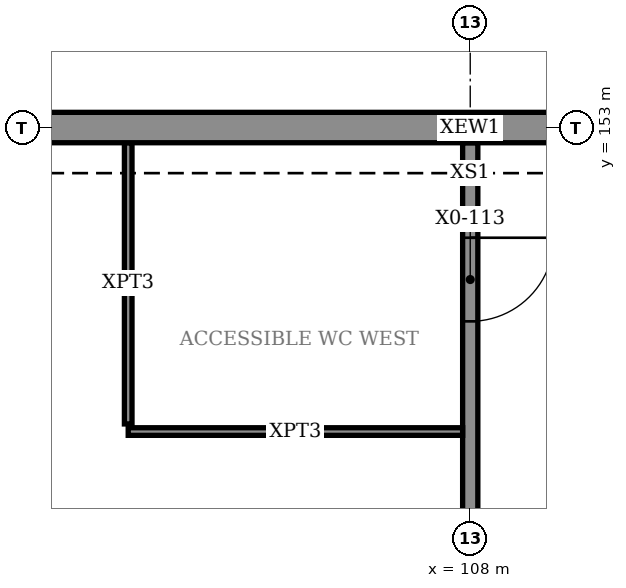
"""IFC4 building model, lengths in metres.
Left out: names, types, materials, properties, quantities, classifications, styles, units other than length and angle.
Written with IfcOpenShell. Run it as: python <this file> out.ifc"""

import sys

from ifc_helpers import new_model, si_unit, direction, frame, frame_2d, origin, place, context, subcontext, project, spatial, rectangle, extrude, element, fill, save


model = new_model("IFC4")
c1 = context("Model", 3, precision=1e-05, world=origin(), true_north=direction((0.0, 1.0)))
c2 = subcontext(c1, "Body", "Model", "MODEL_VIEW")
j1 = project(units=[si_unit("LENGTHUNIT", "METRE"), si_unit("PLANEANGLEUNIT", "RADIAN")], contexts=[c1])
p1 = place(None, origin())
s1 = spatial("IfcSite", under=j1, at=p1, CompositionType="ELEMENT")
p2 = place(p1, origin())
s2 = spatial("IfcBuilding", under=s1, at=p2, CompositionType="ELEMENT")
p3 = place(p2, origin())
s3 = spatial("IfcBuildingStorey", under=s2, at=p3, CompositionType="ELEMENT", Elevation=0.0)
p4 = place(p3, frame((99.5, 153.0, 0.0), z_axis=(0.0, 0.0, 1.0), x_axis=(1.0, 0.0, 0.0)))
e1 = element("IfcWall", 1, at=p4, inside=s3, PredefinedType="SOLIDWALL", context=c2, shape_type="SweptSolid", body=[
    extrude(rectangle(XDim=17.0, YDim=0.4, at=frame_2d((8.5, 0.0))), origin(), (0.0, 0.0, 1.0), 6.0),
])
p5 = place(p4, frame((11.55, 0.0, 0.0)))
e2 = element("IfcOpeningElement", 2, at=p5, cuts=e1, PredefinedType="OPENING", context=c2, shape_type="SweptSolid", body=[
    extrude(rectangle(XDim=2.7, YDim=2.4, at=frame_2d((1.35, 1.2))), frame((0.0, 0.21, 0.0), z_axis=(0.0, -1.0, 0.0), x_axis=(1.0, 0.0, 0.0)), (0.0, 0.0, 1.0), 0.42),
])
p6 = place(p3, frame((108.0, 135.2, 0.0), z_axis=(0.0, 0.0, 1.0), x_axis=(0.0, 1.0, 0.0)))
e3 = element("IfcWall", 3, at=p6, inside=s3, PredefinedType="PARTITIONING", context=c2, shape_type="SweptSolid", body=[
    extrude(rectangle(XDim=17.6, YDim=0.2, at=frame_2d((8.8, 0.0))), origin(), (0.0, 0.0, 1.0), 6.0),
])
p7 = place(p6, frame((3.35, 0.0, 0.015)))
e4 = element("IfcOpeningElement", 4, at=p7, cuts=e3, PredefinedType="OPENING", context=c2, shape_type="SweptSolid", body=[
    extrude(rectangle(XDim=0.9, YDim=2.1, at=frame_2d((0.45, 1.05))), frame((0.0, 0.11, 0.0), z_axis=(0.0, -1.0, 0.0), x_axis=(1.0, 0.0, 0.0)), (0.0, 0.0, 1.0), 0.22),
])
p8 = place(p6, frame((10.35, 0.0, 0.015)))
e5 = element("IfcOpeningElement", 5, at=p8, cuts=e3, PredefinedType="OPENING", context=c2, shape_type="SweptSolid", body=[
    extrude(rectangle(XDim=0.9, YDim=2.1, at=frame_2d((0.45, 1.05))), frame((0.0, 0.11, 0.0), z_axis=(0.0, -1.0, 0.0), x_axis=(1.0, 0.0, 0.0)), (0.0, 0.0, 1.0), 0.22),
])
p9 = place(p6, frame((15.25, 0.0, 0.015)))
e6 = element("IfcOpeningElement", 6, at=p9, cuts=e3, PredefinedType="OPENING", context=c2, shape_type="SweptSolid", body=[
    extrude(rectangle(XDim=1.1, YDim=2.4, at=frame_2d((0.55, 1.2))), frame((0.0, 0.11, 0.0), z_axis=(0.0, -1.0, 0.0), x_axis=(1.0, 0.0, 0.0)), (0.0, 0.0, 1.0), 0.22),
])
p10 = place(p3, frame((103.5, 149.0, 0.0), z_axis=(0.0, 0.0, 1.0), x_axis=(1.0, 0.0, 0.0)))
e7 = element("IfcWall", 7, at=p10, inside=s3, PredefinedType="PARTITIONING", context=c2, shape_type="SweptSolid", body=[
    extrude(rectangle(XDim=4.4, YDim=0.1, at=frame_2d((2.2, 0.0))), origin(), (0.0, 0.0, 1.0), 6.0),
])
p11 = place(p3, frame((103.5, 149.1, 0.0), z_axis=(0.0, 0.0, 1.0), x_axis=(0.0, 1.0, 0.0)))
e8 = element("IfcWall", 8, at=p11, inside=s3, PredefinedType="PARTITIONING", context=c2, shape_type="SweptSolid", body=[
    extrude(rectangle(XDim=3.7, YDim=0.1, at=frame_2d((1.85, 0.0))), origin(), (0.0, 0.0, 1.0), 6.0),
])
p12 = place(p9, frame((1.1, 0.0, 0.0), z_axis=(0.0, 0.0, 1.0), x_axis=(-1.0, 0.0, 0.0)))
e9 = element("IfcDoor", 9, at=p12, inside=s3, OperationType="SINGLE_SWING_RIGHT", PredefinedType="DOOR", context=c2, shape_type="SweptSolid", body=[
    extrude(rectangle(XDim=1.1, YDim=2.4, at=frame_2d((0.55, 1.2))), frame((0.0, 0.025, 0.0), z_axis=(0.0, -1.0, 0.0), x_axis=(1.0, 0.0, 0.0)), (0.0, 0.0, 1.0), 0.05),
])
fill(e6, e9)
save(model, sys.argv[1])
